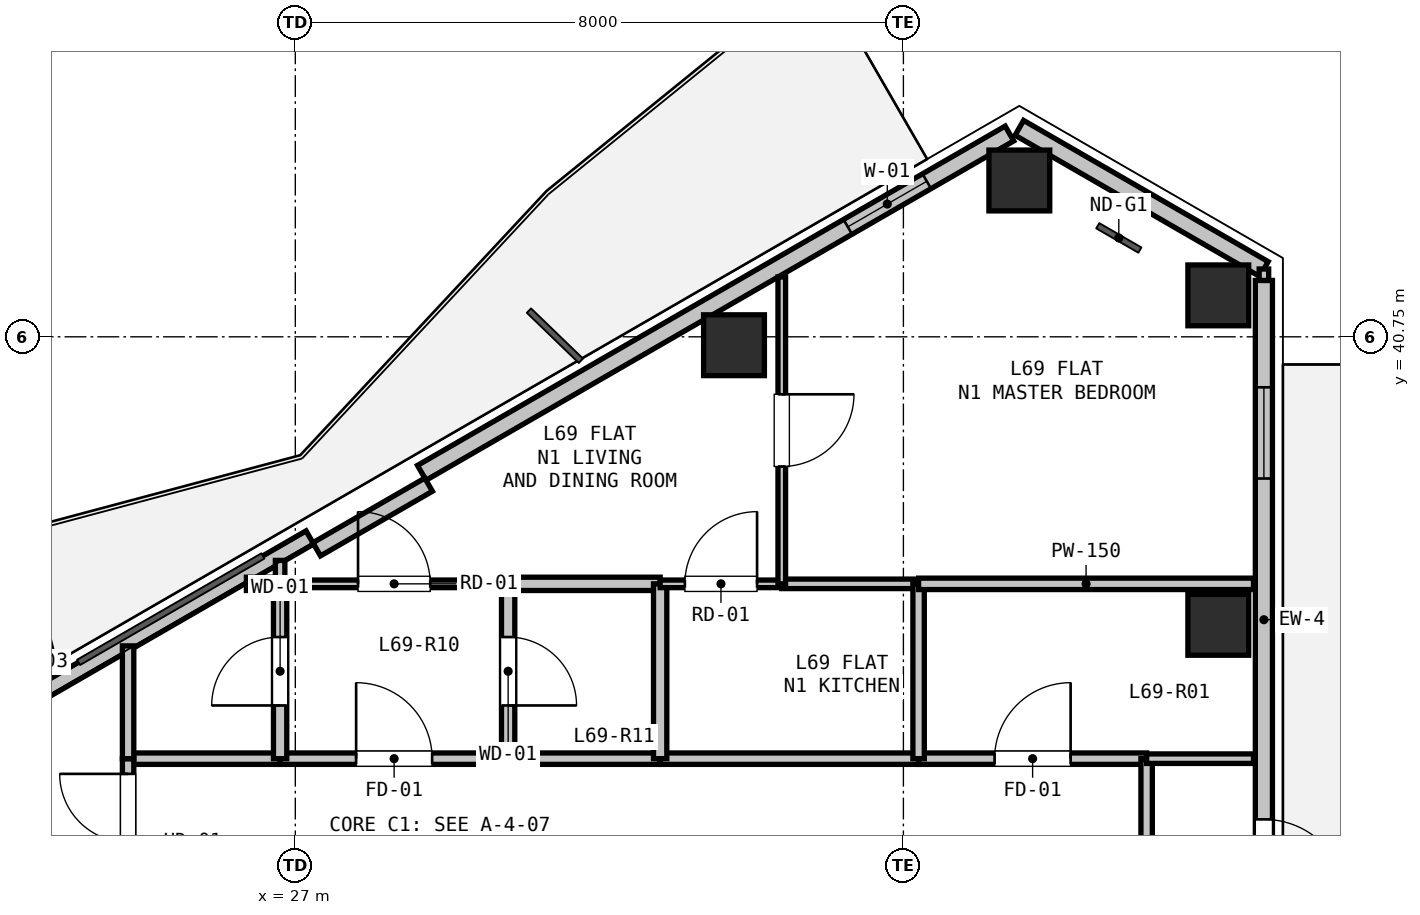
"""IFC4 building model, lengths in metres.
Left out: names, types, materials, properties, quantities, classifications, styles, units other than length and angle.
Written with IfcOpenShell. Run it as: python <this file> out.ifc"""

import sys

from ifc_helpers import new_model, si_unit, direction, frame, frame_2d, origin, origin_2d, place, context, subcontext, project, spatial, rectangle, hollow_rectangle, extrude, element, fill, save


model = new_model("IFC4")
c1 = context("Model", 3, precision=1e-05, world=origin(), true_north=direction((0.0, 1.0)))
c2 = subcontext(c1, "Body", "Model", "MODEL_VIEW")
j1 = project(units=[si_unit("LENGTHUNIT", "METRE"), si_unit("PLANEANGLEUNIT", "RADIAN")], contexts=[c1])
p1 = place(None, origin())
s1 = spatial("IfcSite", under=j1, at=p1, CompositionType="ELEMENT")
p2 = place(p1, origin())
s2 = spatial("IfcBuilding", under=s1, at=p2, CompositionType="ELEMENT")
p3 = place(p2, frame((0.0, 0.0, 246.3)))
s3 = spatial("IfcBuildingStorey", under=s2, at=p3, CompositionType="ELEMENT", Elevation=246.3)
for number, where, z_axis, x_axis in (
    (1, (32.771, 40.639, 0.0), (0.0, 0.0, 1.0), (1.0, 0.0, 0.0)),
    (2, (36.525, 42.807, 0.0), (0.0, 0.0, 1.0), (1.0, 0.0, 0.0)),
    (3, (39.143, 41.295, 0.0), (0.0, 0.0, 1.0), (1.0, 0.0, 0.0)),
    (4, (39.143, 36.961, 0.0), (0.0, 0.0, 1.0), (1.0, 0.0, 0.0)),
):
    element("IfcColumn", number, at=place(p3, frame(where, z_axis=z_axis, x_axis=x_axis)), inside=s3, PredefinedType="COLUMN", context=c2, shape_type="SweptSolid", body=[
        extrude(hollow_rectangle(XDim=0.8, YDim=0.8, WallThickness=0.025, at=origin_2d()), origin(), (0.0, 0.0, 1.0), 3.3),
    ])
p4 = place(p3, frame((36.525, 43.5, 0.0), z_axis=(0.0, 0.0, 1.0), x_axis=(0.866038962515, -0.499976514854, 0.0)))
e5 = element("IfcWall", 5, at=p4, inside=s3, PredefinedType="SOLIDWALL", context=c2, shape_type="SweptSolid", body=[
    extrude(rectangle(XDim=3.716, YDim=0.225, at=frame_2d((1.858, 0.0))), origin(), (0.0, 0.0, 1.0), 2.64),
])
p5 = place(p3, frame((20.066, 33.997, 0.0), z_axis=(0.0, 0.0, 1.0), x_axis=(0.866019557082, 0.500010126649, 0.0)))
e6 = element("IfcWall", 6, at=p5, inside=s3, PredefinedType="PARAPET", context=c2, shape_type="SweptSolid", body=[
    extrude(rectangle(XDim=8.228, YDim=0.2, at=frame_2d((4.114, 0.0))), origin(), (0.0, 0.0, 1.0), 0.2),
])
p6 = place(p3, frame((28.664, 38.96, 0.0), z_axis=(0.0, 0.0, 1.0), x_axis=(0.866026655105, 0.499997832642, 0.0)))
e7 = element("IfcWall", 7, at=p6, inside=s3, PredefinedType="SOLIDWALL", context=c2, shape_type="SweptSolid", body=[
    extrude(rectangle(XDim=8.928, YDim=0.225, at=frame_2d((4.464, 0.0))), origin(), (0.0, 0.0, 1.0), 2.64),
])
p7 = place(p6, frame((6.472, 0.0, 0.9)))
e8 = element("IfcOpeningElement", 8, at=p7, cuts=e7, PredefinedType="OPENING", context=c2, shape_type="SweptSolid", body=[
    extrude(rectangle(XDim=1.2, YDim=1.4, at=frame_2d((0.6, 0.7))), frame((0.0, 0.123, 0.0), z_axis=(0.0, -1.0, 0.0), x_axis=(1.0, 0.0, 0.0)), (0.0, 0.0, 1.0), 0.245),
])
p8 = place(p3, frame((27.281, 37.955, 0.0), z_axis=(0.0, 0.0, 1.0), x_axis=(0.866025371046, 0.500000056704, 0.0)))
e9 = element("IfcWall", 9, at=p8, inside=s3, PredefinedType="PARAPET", context=c2, shape_type="SweptSolid", body=[
    extrude(rectangle(XDim=1.7, YDim=0.2, at=frame_2d((0.85, 0.0))), origin(), (0.0, 0.0, 1.0), 2.64),
])
p9 = place(p3, frame((39.743, 41.492, 0.0), z_axis=(0.0, 0.0, 1.0), x_axis=(0.0, -1.0, 0.0)))
e10 = element("IfcWall", 10, at=p9, inside=s3, PredefinedType="SOLIDWALL", context=c2, shape_type="SweptSolid", body=[
    extrude(rectangle(XDim=8.928, YDim=0.225, at=frame_2d((4.464, 0.0))), origin(), (0.0, 0.0, 1.0), 2.64),
])
p10 = place(p9, frame((7.09, 0.0, 0.0)))
e11 = element("IfcOpeningElement", 11, at=p10, cuts=e10, PredefinedType="OPENING", context=c2, shape_type="SweptSolid", body=[
    extrude(rectangle(XDim=1.1, YDim=2.1, at=frame_2d((0.55, 1.05))), frame((0.0, 0.123, 0.0), z_axis=(0.0, -1.0, 0.0), x_axis=(1.0, 0.0, 0.0)), (0.0, 0.0, 1.0), 0.245),
])
p11 = place(p9, frame((1.406, 0.0, 0.9)))
e12 = element("IfcOpeningElement", 12, at=p11, cuts=e10, PredefinedType="OPENING", context=c2, shape_type="SweptSolid", body=[
    extrude(rectangle(XDim=1.2, YDim=1.4, at=frame_2d((0.6, 0.7))), frame((0.0, 0.123, 0.0), z_axis=(0.0, -1.0, 0.0), x_axis=(1.0, 0.0, 0.0)), (0.0, 0.0, 1.0), 0.245),
])
p12 = place(p3, frame((24.8, 35.2, 0.0), z_axis=(0.0, 0.0, 1.0), x_axis=(1.0, 0.0, 0.0)))
e13 = element("IfcWall", 13, at=p12, inside=s3, PredefinedType="PARTITIONING", context=c2, shape_type="SweptSolid", body=[
    extrude(rectangle(XDim=2.0, YDim=0.15, at=frame_2d((1.0, 0.0))), origin(), (0.0, 0.0, 1.0), 3.02),
])
p13 = place(p3, frame((26.8, 35.2, 0.0), z_axis=(0.0, 0.0, 1.0), x_axis=(1.0, 0.0, 0.0)))
e14 = element("IfcWall", 14, at=p13, inside=s3, PredefinedType="PARTITIONING", context=c2, shape_type="SweptSolid", body=[
    extrude(rectangle(XDim=3.0, YDim=0.15, at=frame_2d((1.5, 0.0))), origin(), (0.0, 0.0, 1.0), 3.02),
])
p14 = place(p13, frame((1.0, 0.0, 0.0)))
e15 = element("IfcOpeningElement", 15, at=p14, cuts=e14, PredefinedType="OPENING", context=c2, shape_type="SweptSolid", body=[
    extrude(rectangle(XDim=1.0, YDim=2.15, at=frame_2d((0.5, 1.075))), frame((0.0, 0.085, 0.0), z_axis=(0.0, -1.0, 0.0), x_axis=(1.0, 0.0, 0.0)), (0.0, 0.0, 1.0), 0.17),
])
p15 = place(p3, frame((29.8, 35.2, 0.0), z_axis=(0.0, 0.0, 1.0), x_axis=(1.0, 0.0, 0.0)))
e16 = element("IfcWall", 16, at=p15, inside=s3, PredefinedType="PARTITIONING", context=c2, shape_type="SweptSolid", body=[
    extrude(rectangle(XDim=2.0, YDim=0.15, at=frame_2d((1.0, 0.0))), origin(), (0.0, 0.0, 1.0), 3.02),
])
p16 = place(p3, frame((31.8, 35.2, 0.0), z_axis=(0.0, 0.0, 1.0), x_axis=(1.0, 0.0, 0.0)))
e17 = element("IfcWall", 17, at=p16, inside=s3, PredefinedType="PARTITIONING", context=c2, shape_type="SweptSolid", body=[
    extrude(rectangle(XDim=3.4, YDim=0.15, at=frame_2d((1.7, 0.0))), origin(), (0.0, 0.0, 1.0), 3.02),
])
p17 = place(p3, frame((35.2, 35.2, 0.0), z_axis=(0.0, 0.0, 1.0), x_axis=(1.0, 0.0, 0.0)))
e18 = element("IfcWall", 18, at=p17, inside=s3, PredefinedType="PARTITIONING", context=c2, shape_type="SweptSolid", body=[
    extrude(rectangle(XDim=3.0, YDim=0.15, at=frame_2d((1.5, 0.0))), origin(), (0.0, 0.0, 1.0), 2.468),
])
p18 = place(p17, frame((1.0, 0.0, 0.0)))
e19 = element("IfcOpeningElement", 19, at=p18, cuts=e18, PredefinedType="OPENING", context=c2, shape_type="SweptSolid", body=[
    extrude(rectangle(XDim=1.0, YDim=2.15, at=frame_2d((0.5, 1.075))), frame((0.0, 0.085, 0.0), z_axis=(0.0, -1.0, 0.0), x_axis=(1.0, 0.0, 0.0)), (0.0, 0.0, 1.0), 0.17),
])
p19 = place(p3, frame((38.2, 35.2, 0.0), z_axis=(0.0, 0.0, 1.0), x_axis=(0.0, -1.0, 0.0)))
e20 = element("IfcWall", 20, at=p19, inside=s3, PredefinedType="PARTITIONING", context=c2, shape_type="SweptSolid", body=[
    extrude(rectangle(XDim=2.45, YDim=0.15, at=frame_2d((1.225, 0.0))), origin(), (0.0, 0.0, 1.0), 3.02),
])
p20 = place(p3, frame((24.8, 33.0, 0.0), z_axis=(0.0, 0.0, 1.0), x_axis=(0.0, 1.0, 0.0)))
e21 = element("IfcWall", 21, at=p20, inside=s3, PredefinedType="PARTITIONING", context=c2, shape_type="SweptSolid", body=[
    extrude(rectangle(XDim=2.2, YDim=0.15, at=frame_2d((1.1, 0.0))), origin(), (0.0, 0.0, 1.0), 2.545),
])
p21 = place(p20, frame((0.2, 0.0, 0.0)))
e22 = element("IfcOpeningElement", 22, at=p21, cuts=e21, PredefinedType="OPENING", context=c2, shape_type="SweptSolid", body=[
    extrude(rectangle(XDim=1.8, YDim=2.2, at=frame_2d((0.9, 1.1))), frame((0.0, 0.085, 0.0), z_axis=(0.0, -1.0, 0.0), x_axis=(1.0, 0.0, 0.0)), (0.0, 0.0, 1.0), 0.17),
])
p22 = place(p3, frame((26.8, 37.5, 0.0), z_axis=(0.0, 0.0, 1.0), x_axis=(1.0, 0.0, 0.0)))
e23 = element("IfcWall", 23, at=p22, inside=s3, PredefinedType="PARTITIONING", context=c2, shape_type="SweptSolid", body=[
    extrude(rectangle(XDim=3.0, YDim=0.1, at=frame_2d((1.5, 0.0))), origin(), (0.0, 0.0, 1.0), 2.365),
])
p23 = place(p22, frame((1.025, 0.0, 0.0)))
e24 = element("IfcOpeningElement", 24, at=p23, cuts=e23, PredefinedType="OPENING", context=c2, shape_type="SweptSolid", body=[
    extrude(rectangle(XDim=0.95, YDim=2.1, at=frame_2d((0.475, 1.05))), frame((0.0, 0.06, 0.0), z_axis=(0.0, -1.0, 0.0), x_axis=(1.0, 0.0, 0.0)), (0.0, 0.0, 1.0), 0.12),
])
p24 = place(p3, frame((29.8, 37.5, 0.0), z_axis=(0.0, 0.0, 1.0), x_axis=(0.0, -1.0, 0.0)))
e25 = element("IfcWall", 25, at=p24, inside=s3, PredefinedType="PLUMBINGWALL", context=c2, shape_type="SweptSolid", body=[
    extrude(rectangle(XDim=2.3, YDim=0.175, at=frame_2d((1.15, 0.0))), origin(), (0.0, 0.0, 1.0), 3.02),
])
p25 = place(p24, frame((0.7, 0.0, 0.0)))
e26 = element("IfcOpeningElement", 26, at=p25, cuts=e25, PredefinedType="OPENING", context=c2, shape_type="SweptSolid", body=[
    extrude(rectangle(XDim=0.9, YDim=2.1, at=frame_2d((0.45, 1.05))), frame((0.0, 0.097, 0.0), z_axis=(0.0, -1.0, 0.0), x_axis=(1.0, 0.0, 0.0)), (0.0, 0.0, 1.0), 0.195),
])
p26 = place(p3, frame((26.8, 35.2, 0.0), z_axis=(0.0, 0.0, 1.0), x_axis=(0.0, 1.0, 0.0)))
e27 = element("IfcWall", 27, at=p26, inside=s3, PredefinedType="PLUMBINGWALL", context=c2, shape_type="SweptSolid", body=[
    extrude(rectangle(XDim=2.3, YDim=0.175, at=frame_2d((1.15, 0.0))), origin(), (0.0, 0.0, 1.0), 2.365),
])
p27 = place(p26, frame((0.7, 0.0, 0.0)))
e28 = element("IfcOpeningElement", 28, at=p27, cuts=e27, PredefinedType="OPENING", context=c2, shape_type="SweptSolid", body=[
    extrude(rectangle(XDim=0.9, YDim=2.1, at=frame_2d((0.45, 1.05))), frame((0.0, 0.097, 0.0), z_axis=(0.0, -1.0, 0.0), x_axis=(1.0, 0.0, 0.0)), (0.0, 0.0, 1.0), 0.195),
])
p28 = place(p3, frame((24.8, 35.2, 0.0), z_axis=(0.0, 0.0, 1.0), x_axis=(0.0, 1.0, 0.0)))
e29 = element("IfcWall", 29, at=p28, inside=s3, PredefinedType="PARTITIONING", context=c2, shape_type="SweptSolid", body=[
    extrude(rectangle(XDim=1.484, YDim=0.15, at=frame_2d((0.742, 0.0))), origin(), (0.0, 0.0, 1.0), 2.365),
])
p29 = place(p3, frame((26.357, 37.5, 0.0), z_axis=(0.0, 0.0, 1.0), x_axis=(1.0, 0.0, 0.0)))
e30 = element("IfcWall", 30, at=p29, inside=s3, PredefinedType="PLUMBINGWALL", context=c2, shape_type="SweptSolid", body=[
    extrude(rectangle(XDim=0.428, YDim=0.175, at=frame_2d((0.214, 0.0))), origin(), (0.0, 0.0, 1.0), 3.02),
])
p30 = place(p3, frame((29.8, 37.5, 0.0), z_axis=(0.0, 0.0, 1.0), x_axis=(1.0, 0.0, 0.0)))
e31 = element("IfcWall", 31, at=p30, inside=s3, PredefinedType="PLUMBINGWALL", context=c2, shape_type="SweptSolid", body=[
    extrude(rectangle(XDim=2.0, YDim=0.175, at=frame_2d((1.0, 0.0))), origin(), (0.0, 0.0, 1.0), 3.02),
])
p31 = place(p3, frame((31.8, 37.5, 0.0), z_axis=(0.0, 0.0, 1.0), x_axis=(0.0, -1.0, 0.0)))
e32 = element("IfcWall", 32, at=p31, inside=s3, PredefinedType="PLUMBINGWALL", context=c2, shape_type="SweptSolid", body=[
    extrude(rectangle(XDim=2.3, YDim=0.175, at=frame_2d((1.15, 0.0))), origin(), (0.0, 0.0, 1.0), 3.02),
])
p32 = place(p3, frame((31.8, 37.5, 0.0), z_axis=(0.0, 0.0, 1.0), x_axis=(1.0, 0.0, 0.0)))
e33 = element("IfcWall", 33, at=p32, inside=s3, PredefinedType="PARTITIONING", context=c2, shape_type="SweptSolid", body=[
    extrude(rectangle(XDim=1.6, YDim=0.1, at=frame_2d((0.8, 0.0))), origin(), (0.0, 0.0, 1.0), 3.02),
])
p33 = place(p32, frame((0.325, 0.0, 0.0)))
e34 = element("IfcOpeningElement", 34, at=p33, cuts=e33, PredefinedType="OPENING", context=c2, shape_type="SweptSolid", body=[
    extrude(rectangle(XDim=0.95, YDim=2.1, at=frame_2d((0.475, 1.05))), frame((0.0, 0.06, 0.0), z_axis=(0.0, -1.0, 0.0), x_axis=(1.0, 0.0, 0.0)), (0.0, 0.0, 1.0), 0.12),
])
p34 = place(p3, frame((33.4, 37.5, 0.0), z_axis=(0.0, 0.0, 1.0), x_axis=(1.0, 0.0, 0.0)))
e35 = element("IfcWall", 35, at=p34, inside=s3, PredefinedType="PARTITIONING", context=c2, shape_type="SweptSolid", body=[
    extrude(rectangle(XDim=1.8, YDim=0.125, at=frame_2d((0.9, 0.0))), origin(), (0.0, 0.0, 1.0), 3.02),
])
p35 = place(p3, frame((35.2, 37.5, 0.0), z_axis=(0.0, 0.0, 1.0), x_axis=(0.0, -1.0, 0.0)))
e36 = element("IfcWall", 36, at=p35, inside=s3, PredefinedType="PARTITIONING", context=c2, shape_type="SweptSolid", body=[
    extrude(rectangle(XDim=2.3, YDim=0.15, at=frame_2d((1.15, 0.0))), origin(), (0.0, 0.0, 1.0), 3.02),
])
p36 = place(p3, frame((39.606, 35.2, 0.0), z_axis=(0.0, 0.0, 1.0), x_axis=(-1.0, 0.0, 0.0)))
e37 = element("IfcWall", 37, at=p36, inside=s3, PredefinedType="PARTITIONING", context=c2, shape_type="SweptSolid", body=[
    extrude(rectangle(XDim=1.406, YDim=0.125, at=frame_2d((0.703, 0.0))), origin(), (0.0, 0.0, 1.0), 2.365),
])
p37 = place(p3, frame((35.2, 37.5, 0.0), z_axis=(0.0, 0.0, 1.0), x_axis=(1.0, 0.0, 0.0)))
e38 = element("IfcWall", 38, at=p37, inside=s3, PredefinedType="PARTITIONING", context=c2, shape_type="SweptSolid", body=[
    extrude(rectangle(XDim=4.406, YDim=0.15, at=frame_2d((2.203, 0.0))), origin(), (0.0, 0.0, 1.0), 2.468),
])
p38 = place(p3, frame((26.8, 37.5, 0.0), z_axis=(0.0, 0.0, 1.0), x_axis=(0.0, 1.0, 0.0)))
e39 = element("IfcWall", 39, at=p38, inside=s3, PredefinedType="PARTITIONING", context=c2, shape_type="SweptSolid", body=[
    extrude(rectangle(XDim=0.308, YDim=0.125, at=frame_2d((0.154, 0.0))), origin(), (0.0, 0.0, 1.0), 3.02),
])
p39 = place(p3, frame((33.4, 41.537, 0.0), z_axis=(0.0, 0.0, 1.0), x_axis=(0.0, -1.0, 0.0)))
e40 = element("IfcWall", 40, at=p39, inside=s3, PredefinedType="PARTITIONING", context=c2, shape_type="SweptSolid", body=[
    extrude(rectangle(XDim=4.037, YDim=0.1, at=frame_2d((2.019, 0.0))), origin(), (0.0, 0.0, 1.0), 2.745),
])
p40 = place(p39, frame((1.544, 0.0, 0.0)))
e41 = element("IfcOpeningElement", 41, at=p40, cuts=e40, PredefinedType="OPENING", context=c2, shape_type="SweptSolid", body=[
    extrude(rectangle(XDim=0.95, YDim=2.1, at=frame_2d((0.475, 1.05))), frame((0.0, 0.06, 0.0), z_axis=(0.0, -1.0, 0.0), x_axis=(1.0, 0.0, 0.0)), (0.0, 0.0, 1.0), 0.12),
])
p41 = place(p3, frame((39.743, 41.642, 0.0), z_axis=(0.0, 0.0, 1.0), x_axis=(0.0, -1.0, 0.0)))
e42 = element("IfcWall", 42, at=p41, inside=s3, PredefinedType="PARTITIONING", context=c2, shape_type="SweptSolid", body=[
    extrude(rectangle(XDim=0.15, YDim=0.125, at=frame_2d((0.075, 0.0))), origin(), (0.0, 0.0, 1.0), 3.02),
])
p42 = place(p7, origin())
e43 = element("IfcWindow", 43, at=p42, inside=s3, PartitioningType="SINGLE_PANEL", PredefinedType="WINDOW", context=c2, shape_type="SweptSolid", body=[
    extrude(rectangle(XDim=1.2, YDim=1.4, at=frame_2d((0.6, 0.7))), frame((0.0, 0.03, 0.0), z_axis=(0.0, -1.0, 0.0), x_axis=(1.0, 0.0, 0.0)), (0.0, 0.0, 1.0), 0.06),
])
fill(e8, e43)
p43 = place(p10, origin())
e44 = element("IfcDoor", 44, at=p43, inside=s3, OperationType="SINGLE_SWING_RIGHT", PredefinedType="DOOR", context=c2, shape_type="SweptSolid", body=[
    extrude(rectangle(XDim=1.1, YDim=2.1, at=frame_2d((0.55, 1.05))), frame((0.0, 0.025, 0.0), z_axis=(0.0, -1.0, 0.0), x_axis=(1.0, 0.0, 0.0)), (0.0, 0.0, 1.0), 0.05),
])
fill(e11, e44)
p44 = place(p11, origin())
e45 = element("IfcWindow", 45, at=p44, inside=s3, PartitioningType="SINGLE_PANEL", PredefinedType="WINDOW", context=c2, shape_type="SweptSolid", body=[
    extrude(rectangle(XDim=1.2, YDim=1.4, at=frame_2d((0.6, 0.7))), frame((0.0, 0.03, 0.0), z_axis=(0.0, -1.0, 0.0), x_axis=(1.0, 0.0, 0.0)), (0.0, 0.0, 1.0), 0.06),
])
fill(e12, e45)
p45 = place(p14, origin())
e46 = element("IfcDoor", 46, at=p45, inside=s3, OperationType="SINGLE_SWING_LEFT", PredefinedType="DOOR", context=c2, shape_type="SweptSolid", body=[
    extrude(rectangle(XDim=1.0, YDim=2.15, at=frame_2d((0.5, 1.075))), frame((0.0, 0.025, 0.0), z_axis=(0.0, -1.0, 0.0), x_axis=(1.0, 0.0, 0.0)), (0.0, 0.0, 1.0), 0.05),
])
fill(e15, e46)
p46 = place(p18, origin())
e47 = element("IfcDoor", 47, at=p46, inside=s3, OperationType="SINGLE_SWING_RIGHT", PredefinedType="DOOR", context=c2, shape_type="SweptSolid", body=[
    extrude(rectangle(XDim=1.0, YDim=2.15, at=frame_2d((0.5, 1.075))), frame((0.0, 0.025, 0.0), z_axis=(0.0, -1.0, 0.0), x_axis=(1.0, 0.0, 0.0)), (0.0, 0.0, 1.0), 0.05),
])
fill(e19, e47)
p47 = place(p21, origin())
e48 = element("IfcDoor", 48, at=p47, inside=s3, OperationType="DOUBLE_DOOR_SINGLE_SWING", PredefinedType="DOOR", context=c2, shape_type="SweptSolid", body=[
    extrude(rectangle(XDim=1.8, YDim=2.2, at=frame_2d((0.9, 1.1))), frame((0.0, 0.025, 0.0), z_axis=(0.0, -1.0, 0.0), x_axis=(1.0, 0.0, 0.0)), (0.0, 0.0, 1.0), 0.05),
])
fill(e22, e48)
p48 = place(p27, origin())
e49 = element("IfcDoor", 49, at=p48, inside=s3, OperationType="SINGLE_SWING_LEFT", PredefinedType="DOOR", context=c2, shape_type="SweptSolid", body=[
    extrude(rectangle(XDim=0.9, YDim=2.1, at=frame_2d((0.45, 1.05))), frame((0.0, 0.025, 0.0), z_axis=(0.0, -1.0, 0.0), x_axis=(1.0, 0.0, 0.0)), (0.0, 0.0, 1.0), 0.05),
])
fill(e28, e49)
p49 = place(p25, origin())
e50 = element("IfcDoor", 50, at=p49, inside=s3, OperationType="SINGLE_SWING_RIGHT", PredefinedType="DOOR", context=c2, shape_type="SweptSolid", body=[
    extrude(rectangle(XDim=0.9, YDim=2.1, at=frame_2d((0.45, 1.05))), frame((0.0, 0.025, 0.0), z_axis=(0.0, -1.0, 0.0), x_axis=(1.0, 0.0, 0.0)), (0.0, 0.0, 1.0), 0.05),
])
fill(e26, e50)
p50 = place(p23, origin())
e51 = element("IfcDoor", 51, at=p50, inside=s3, OperationType="SINGLE_SWING_LEFT", PredefinedType="DOOR", context=c2, shape_type="SweptSolid", body=[
    extrude(rectangle(XDim=0.95, YDim=2.1, at=frame_2d((0.475, 1.05))), frame((0.0, 0.025, 0.0), z_axis=(0.0, -1.0, 0.0), x_axis=(1.0, 0.0, 0.0)), (0.0, 0.0, 1.0), 0.05),
])
fill(e24, e51)
p51 = place(p33, origin())
e52 = element("IfcDoor", 52, at=p51, inside=s3, OperationType="SINGLE_SWING_RIGHT", PredefinedType="DOOR", context=c2, shape_type="SweptSolid", body=[
    extrude(rectangle(XDim=0.95, YDim=2.1, at=frame_2d((0.475, 1.05))), frame((0.0, 0.025, 0.0), z_axis=(0.0, -1.0, 0.0), x_axis=(1.0, 0.0, 0.0)), (0.0, 0.0, 1.0), 0.05),
])
fill(e34, e52)
p52 = place(p40, origin())
e53 = element("IfcDoor", 53, at=p52, inside=s3, OperationType="SINGLE_SWING_LEFT", PredefinedType="DOOR", context=c2, shape_type="SweptSolid", body=[
    extrude(rectangle(XDim=0.95, YDim=2.1, at=frame_2d((0.475, 1.05))), frame((0.0, 0.025, 0.0), z_axis=(0.0, -1.0, 0.0), x_axis=(1.0, 0.0, 0.0)), (0.0, 0.0, 1.0), 0.05),
])
fill(e41, e53)
save(model, sys.argv[1])
